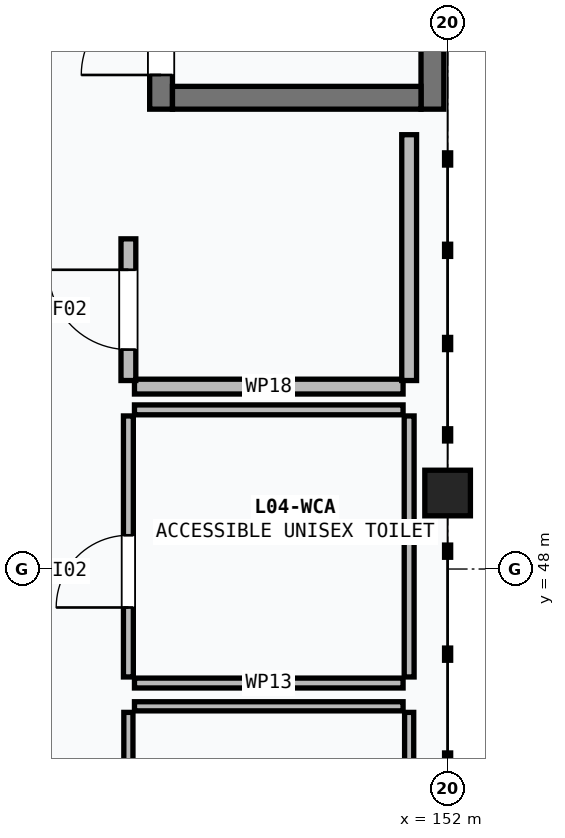
"""IFC4 building model, lengths in metres.
Left out: names, types, materials, properties, quantities, classifications, styles, units other than length and angle.
Written with IfcOpenShell. Run it as: python <this file> out.ifc"""

import sys

from ifc_helpers import new_model, si_unit, direction, frame, frame_2d, origin, origin_2d, place, context, subcontext, project, spatial, rectangle, extrude, element, fill, save


model = new_model("IFC4")
c1 = context("Model", 3, precision=1e-05, world=origin(), true_north=direction((0.0, 1.0)))
c2 = subcontext(c1, "Body", "Model", "MODEL_VIEW")
j1 = project(units=[si_unit("LENGTHUNIT", "METRE"), si_unit("PLANEANGLEUNIT", "RADIAN")], contexts=[c1])
p1 = place(None, origin())
s1 = spatial("IfcSite", under=j1, at=p1, CompositionType="ELEMENT")
p2 = place(p1, origin())
s2 = spatial("IfcBuilding", under=s1, at=p2, CompositionType="ELEMENT")
p3 = place(p2, frame((0.0, 0.0, 15.6)))
s3 = spatial("IfcBuildingStorey", under=s2, at=p3, CompositionType="ELEMENT", Elevation=15.6)
p4 = place(p3, frame((152.0, 49.0, 0.0), z_axis=(0.0, 0.0, 1.0), x_axis=(1.0, 0.0, 0.0)))
e1 = element("IfcColumn", 1, at=p4, inside=s3, PredefinedType="COLUMN", context=c2, shape_type="SweptSolid", body=[
    extrude(rectangle(XDim=0.6, YDim=0.6, at=origin_2d()), origin(), (0.0, 0.0, 1.0), 3.6),
])
p5 = place(p3, frame((148.23, 54.05, 0.0), z_axis=(0.0, 0.0, 1.0), x_axis=(0.0, 1.0, 0.0)))
e2 = element("IfcWall", 2, at=p5, inside=s3, PredefinedType="SHEAR", context=c2, shape_type="SweptSolid", body=[
    extrude(rectangle(XDim=9.9, YDim=0.3, at=frame_2d((4.95, 0.0))), origin(), (0.0, 0.0, 1.0), 3.6),
])
p6 = place(p5, frame((0.45, 0.0, 0.0)))
e3 = element("IfcOpeningElement", 3, at=p6, cuts=e2, PredefinedType="OPENING", context=c2, shape_type="SweptSolid", body=[
    extrude(rectangle(XDim=1.05, YDim=2.15, at=frame_2d((0.525, 1.075))), frame((0.0, 0.16, 0.0), z_axis=(0.0, -1.0, 0.0), x_axis=(1.0, 0.0, 0.0)), (0.0, 0.0, 1.0), 0.32),
])
p7 = place(p3, frame((151.8, 63.95, 0.0), z_axis=(0.0, 0.0, 1.0), x_axis=(0.0, -1.0, 0.0)))
e4 = element("IfcWall", 4, at=p7, inside=s3, PredefinedType="SHEAR", context=c2, shape_type="SweptSolid", body=[
    extrude(rectangle(XDim=9.9, YDim=0.3, at=frame_2d((4.95, 0.0))), origin(), (0.0, 0.0, 1.0), 3.6),
])
p8 = place(p3, frame((151.65, 54.2, 0.0), z_axis=(0.0, 0.0, 1.0), x_axis=(-1.0, 0.0, 0.0)))
e5 = element("IfcWall", 5, at=p8, inside=s3, PredefinedType="SHEAR", context=c2, shape_type="SweptSolid", body=[
    extrude(rectangle(XDim=3.27, YDim=0.3, at=frame_2d((1.635, 0.0))), origin(), (0.0, 0.0, 1.0), 3.6),
])
p9 = place(p3, frame((147.88, 46.194, 0.0), z_axis=(0.0, 0.0, 1.0), x_axis=(1.0, 0.0, 0.0)))
e6 = element("IfcWall", 6, at=p9, inside=s3, PredefinedType="PARTITIONING", context=c2, shape_type="SweptSolid", body=[
    extrude(rectangle(XDim=3.534, YDim=0.12, at=frame_2d((1.767, 0.0))), origin(), (0.0, 0.0, 1.0), 3.345),
])
p10 = place(p3, frame((147.8, 42.68, 0.0), z_axis=(0.0, 0.0, 1.0), x_axis=(0.0, 1.0, 0.0)))
e7 = element("IfcWall", 7, at=p10, inside=s3, PredefinedType="PARTITIONING", context=c2, shape_type="SweptSolid", body=[
    extrude(rectangle(XDim=3.434, YDim=0.12, at=frame_2d((1.717, 0.0))), origin(), (0.0, 0.0, 1.0), 2.755),
])
p11 = place(p10, frame((1.267, 0.0, 0.0)))
e8 = element("IfcOpeningElement", 8, at=p11, cuts=e7, PredefinedType="OPENING", context=c2, shape_type="SweptSolid", body=[
    extrude(rectangle(XDim=0.9, YDim=2.1, at=frame_2d((0.45, 1.05))), frame((0.0, 0.07, 0.0), z_axis=(0.0, -1.0, 0.0), x_axis=(1.0, 0.0, 0.0)), (0.0, 0.0, 1.0), 0.14),
])
p12 = place(p3, frame((151.494, 42.68, 0.0), z_axis=(0.0, 0.0, 1.0), x_axis=(0.0, 1.0, 0.0)))
e9 = element("IfcWall", 9, at=p12, inside=s3, PredefinedType="PARTITIONING", context=c2, shape_type="SweptSolid", body=[
    extrude(rectangle(XDim=3.434, YDim=0.12, at=frame_2d((1.717, 0.0))), origin(), (0.0, 0.0, 1.0), 2.755),
])
for number, where, z_axis, x_axis in (
    (10, (147.88, 46.5, 0.0), (0.0, 0.0, 1.0), (1.0, 0.0, 0.0)),
    (11, (147.88, 50.094, 0.0), (0.0, 0.0, 1.0), (1.0, 0.0, 0.0)),
):
    element("IfcWall", number, at=place(p3, frame(where, z_axis=z_axis, x_axis=x_axis)), inside=s3, PredefinedType="PARTITIONING", context=c2, shape_type="SweptSolid", body=[
        extrude(rectangle(XDim=3.534, YDim=0.13, at=frame_2d((1.767, 0.0))), origin(), (0.0, 0.0, 1.0), 3.345),
    ])
p13 = place(p3, frame((147.8, 46.58, 0.0), z_axis=(0.0, 0.0, 1.0), x_axis=(0.0, 1.0, 0.0)))
e12 = element("IfcWall", 12, at=p13, inside=s3, PredefinedType="PARTITIONING", context=c2, shape_type="SweptSolid", body=[
    extrude(rectangle(XDim=3.434, YDim=0.13, at=frame_2d((1.717, 0.0))), origin(), (0.0, 0.0, 1.0), 2.795),
])
p14 = place(p13, frame((0.914, 0.0, 0.0)))
e13 = element("IfcOpeningElement", 13, at=p14, cuts=e12, PredefinedType="OPENING", context=c2, shape_type="SweptSolid", body=[
    extrude(rectangle(XDim=0.95, YDim=2.1, at=frame_2d((0.475, 1.05))), frame((0.0, 0.075, 0.0), z_axis=(0.0, -1.0, 0.0), x_axis=(1.0, 0.0, 0.0)), (0.0, 0.0, 1.0), 0.15),
])
p15 = place(p3, frame((151.494, 46.58, 0.0), z_axis=(0.0, 0.0, 1.0), x_axis=(0.0, 1.0, 0.0)))
e14 = element("IfcWall", 14, at=p15, inside=s3, PredefinedType="PARTITIONING", context=c2, shape_type="SweptSolid", body=[
    extrude(rectangle(XDim=3.434, YDim=0.13, at=frame_2d((1.717, 0.0))), origin(), (0.0, 0.0, 1.0), 2.795),
])
p16 = place(p3, frame((147.88, 50.4, 0.0), z_axis=(0.0, 0.0, 1.0), x_axis=(1.0, 0.0, 0.0)))
e15 = element("IfcWall", 15, at=p16, inside=s3, PredefinedType="PARTITIONING", context=c2, shape_type="SweptSolid", body=[
    extrude(rectangle(XDim=3.534, YDim=0.195, at=frame_2d((1.767, 0.0))), origin(), (0.0, 0.0, 1.0), 3.345),
])
p17 = place(p3, frame((147.8, 50.48, 0.0), z_axis=(0.0, 0.0, 1.0), x_axis=(0.0, 1.0, 0.0)))
e16 = element("IfcWall", 16, at=p17, inside=s3, PredefinedType="PARTITIONING", context=c2, shape_type="SweptSolid", body=[
    extrude(rectangle(XDim=1.864, YDim=0.195, at=frame_2d((0.932, 0.0))), origin(), (0.0, 0.0, 1.0), 2.755),
])
p18 = place(p17, frame((0.407, 0.0, 0.0)))
e17 = element("IfcOpeningElement", 17, at=p18, cuts=e16, PredefinedType="OPENING", context=c2, shape_type="SweptSolid", body=[
    extrude(rectangle(XDim=1.05, YDim=2.15, at=frame_2d((0.525, 1.075))), frame((0.0, 0.107, 0.0), z_axis=(0.0, -1.0, 0.0), x_axis=(1.0, 0.0, 0.0)), (0.0, 0.0, 1.0), 0.215),
])
p19 = place(p3, frame((151.494, 50.48, 0.0), z_axis=(0.0, 0.0, 1.0), x_axis=(0.0, 1.0, 0.0)))
e18 = element("IfcWall", 18, at=p19, inside=s3, PredefinedType="PARTITIONING", context=c2, shape_type="SweptSolid", body=[
    extrude(rectangle(XDim=3.234, YDim=0.195, at=frame_2d((1.617, 0.0))), origin(), (0.0, 0.0, 1.0), 2.755),
])
p20 = place(p6, origin())
e19 = element("IfcDoor", 19, at=p20, inside=s3, OperationType="SINGLE_SWING_LEFT", PredefinedType="DOOR", context=c2, shape_type="SweptSolid", body=[
    extrude(rectangle(XDim=1.05, YDim=2.15, at=frame_2d((0.525, 1.075))), frame((0.0, 0.025, 0.0), z_axis=(0.0, -1.0, 0.0), x_axis=(1.0, 0.0, 0.0)), (0.0, 0.0, 1.0), 0.05),
])
fill(e3, e19)
p21 = place(p14, origin())
e20 = element("IfcDoor", 20, at=p21, inside=s3, OperationType="SINGLE_SWING_LEFT", PredefinedType="DOOR", context=c2, shape_type="SweptSolid", body=[
    extrude(rectangle(XDim=0.95, YDim=2.1, at=frame_2d((0.475, 1.05))), frame((0.0, 0.025, 0.0), z_axis=(0.0, -1.0, 0.0), x_axis=(1.0, 0.0, 0.0)), (0.0, 0.0, 1.0), 0.05),
])
fill(e13, e20)
p22 = place(p18, origin())
e21 = element("IfcDoor", 21, at=p22, inside=s3, OperationType="SINGLE_SWING_RIGHT", PredefinedType="DOOR", context=c2, shape_type="SweptSolid", body=[
    extrude(rectangle(XDim=1.05, YDim=2.15, at=frame_2d((0.525, 1.075))), frame((0.0, 0.025, 0.0), z_axis=(0.0, -1.0, 0.0), x_axis=(1.0, 0.0, 0.0)), (0.0, 0.0, 1.0), 0.05),
])
fill(e17, e21)
save(model, sys.argv[1])
